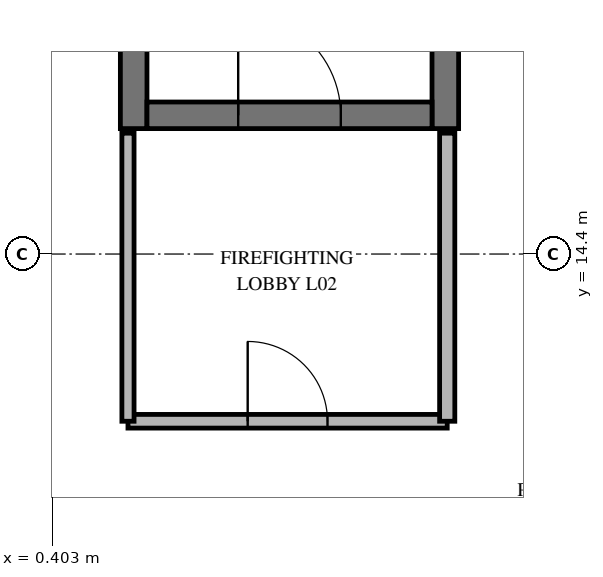
"""IFC4 building model, lengths in metres.
Left out: names, types, materials, properties, quantities, classifications, styles, units other than length and angle.
Written with IfcOpenShell. Run it as: python <this file> out.ifc"""

import sys

from ifc_helpers import new_model, si_unit, direction, frame, frame_2d, origin, place, context, subcontext, project, spatial, rectangle, extrude, element, fill, save


model = new_model("IFC4")
c1 = context("Model", 3, precision=1e-05, world=origin(), true_north=direction((0.0, 1.0)))
c2 = subcontext(c1, "Body", "Model", "MODEL_VIEW")
j1 = project(units=[si_unit("LENGTHUNIT", "METRE"), si_unit("PLANEANGLEUNIT", "RADIAN")], contexts=[c1])
p1 = place(None, origin())
s1 = spatial("IfcSite", under=j1, at=p1, CompositionType="ELEMENT")
p2 = place(p1, origin())
s2 = spatial("IfcBuilding", under=s1, at=p2, CompositionType="ELEMENT")
p3 = place(p2, frame((0.0, 0.0, 8.7)))
s3 = spatial("IfcBuildingStorey", under=s2, at=p3, CompositionType="ELEMENT", Elevation=8.7)
for number, where, z_axis, x_axis in (
    (1, (5.575, 16.05, 0.0), (0.0, 0.0, 1.0), (0.0, 1.0, 0.0)),
    (2, (1.475, 25.15, 0.0), (0.0, 0.0, 1.0), (0.0, -1.0, 0.0)),
):
    element("IfcWall", number, at=place(p3, frame(where, z_axis=z_axis, x_axis=x_axis)), inside=s3, PredefinedType="SHEAR", context=c2, shape_type="SweptSolid", body=[
        extrude(rectangle(XDim=9.1, YDim=0.35, at=frame_2d((4.55, 0.0))), origin(), (0.0, 0.0, 1.0), 3.96),
    ])
p4 = place(p3, frame((1.65, 16.225, 0.0), z_axis=(0.0, 0.0, 1.0), x_axis=(1.0, 0.0, 0.0)))
e3 = element("IfcWall", 3, at=p4, inside=s3, PredefinedType="SHEAR", context=c2, shape_type="SweptSolid", body=[
    extrude(rectangle(XDim=3.75, YDim=0.35, at=frame_2d((1.875, 0.0))), origin(), (0.0, 0.0, 1.0), 3.96),
])
p5 = place(p4, frame((1.2, 0.0, 0.0)))
e4 = element("IfcOpeningElement", 4, at=p5, cuts=e3, PredefinedType="OPENING", context=c2, shape_type="SweptSolid", body=[
    extrude(rectangle(XDim=1.35, YDim=2.2, at=frame_2d((0.675, 1.1))), frame((0.0, 0.185, 0.0), z_axis=(0.0, -1.0, 0.0), x_axis=(1.0, 0.0, 0.0)), (0.0, 0.0, 1.0), 0.37),
])
p6 = place(p3, frame((1.4, 12.2, 0.0), z_axis=(0.0, 0.0, 1.0), x_axis=(1.0, 0.0, 0.0)))
e5 = element("IfcWall", 5, at=p6, inside=s3, PredefinedType="PARTITIONING", context=c2, shape_type="SweptSolid", body=[
    extrude(rectangle(XDim=4.2, YDim=0.18, at=frame_2d((2.1, 0.0))), origin(), (0.0, 0.0, 1.0), 3.96),
])
p7 = place(p6, frame((1.575, 0.0, 0.0)))
e6 = element("IfcOpeningElement", 6, at=p7, cuts=e5, PredefinedType="OPENING", context=c2, shape_type="SweptSolid", body=[
    extrude(rectangle(XDim=1.05, YDim=2.15, at=frame_2d((0.525, 1.075))), frame((0.0, 0.1, 0.0), z_axis=(0.0, -1.0, 0.0), x_axis=(1.0, 0.0, 0.0)), (0.0, 0.0, 1.0), 0.2),
])
p8 = place(p3, frame((1.4, 15.99, 0.0), z_axis=(0.0, 0.0, 1.0), x_axis=(0.0, -1.0, 0.0)))
e7 = element("IfcWall", 7, at=p8, inside=s3, PredefinedType="PARTITIONING", context=c2, shape_type="SweptSolid", body=[
    extrude(rectangle(XDim=3.79, YDim=0.16, at=frame_2d((1.895, 0.0))), origin(), (0.0, 0.0, 1.0), 3.21),
])
p9 = place(p3, frame((5.6, 12.2, 0.0), z_axis=(0.0, 0.0, 1.0), x_axis=(0.0, 1.0, 0.0)))
e8 = element("IfcWall", 8, at=p9, inside=s3, PredefinedType="PARTITIONING", context=c2, shape_type="SweptSolid", body=[
    extrude(rectangle(XDim=3.79, YDim=0.2, at=frame_2d((1.895, 0.0))), origin(), (0.0, 0.0, 1.0), 3.21),
])
p10 = place(p5, origin())
e9 = element("IfcDoor", 9, at=p10, inside=s3, OperationType="SINGLE_SWING_LEFT", PredefinedType="DOOR", context=c2, shape_type="SweptSolid", body=[
    extrude(rectangle(XDim=1.35, YDim=2.2, at=frame_2d((0.675, 1.1))), frame((0.0, 0.025, 0.0), z_axis=(0.0, -1.0, 0.0), x_axis=(1.0, 0.0, 0.0)), (0.0, 0.0, 1.0), 0.05),
])
fill(e4, e9)
p11 = place(p7, origin())
e10 = element("IfcDoor", 10, at=p11, inside=s3, OperationType="SINGLE_SWING_LEFT", PredefinedType="DOOR", context=c2, shape_type="SweptSolid", body=[
    extrude(rectangle(XDim=1.05, YDim=2.15, at=frame_2d((0.525, 1.075))), frame((0.0, 0.025, 0.0), z_axis=(0.0, -1.0, 0.0), x_axis=(1.0, 0.0, 0.0)), (0.0, 0.0, 1.0), 0.05),
])
fill(e6, e10)
save(model, sys.argv[1])
